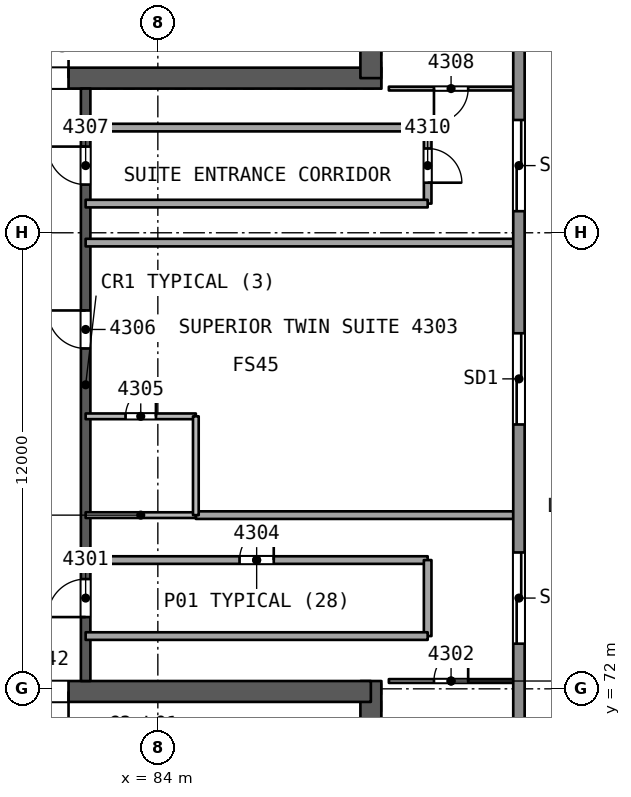
"""IFC4 building model, lengths in metres.
Left out: names, types, materials, properties, quantities, classifications, styles, units other than length and angle.
Written with IfcOpenShell. Run it as: python <this file> out.ifc"""

import sys

from ifc_helpers import new_model, si_unit, direction, frame, frame_2d, origin, place, context, subcontext, project, spatial, rectangle, extrude, element, fill, save


model = new_model("IFC4")
c1 = context("Model", 3, precision=1e-05, world=origin(), true_north=direction((0.0, 1.0)))
c2 = subcontext(c1, "Body", "Model", "MODEL_VIEW")
j1 = project(units=[si_unit("LENGTHUNIT", "METRE"), si_unit("PLANEANGLEUNIT", "RADIAN")], contexts=[c1])
p1 = place(None, origin())
s1 = spatial("IfcSite", under=j1, at=p1, CompositionType="ELEMENT")
p2 = place(p1, origin())
s2 = spatial("IfcBuilding", under=s1, at=p2, CompositionType="ELEMENT")
p3 = place(p2, frame((0.0, 0.0, 178.5)))
s3 = spatial("IfcBuildingStorey", under=s2, at=p3, CompositionType="ELEMENT", Elevation=178.5)
p4 = place(p3, frame((79.659, 88.069, 0.0), z_axis=(0.0, 0.0, 1.0), x_axis=(1.0, 0.0, 0.0)))
e1 = element("IfcWall", 1, at=p4, inside=s3, PredefinedType="SHEAR", context=c2, shape_type="SweptSolid", body=[
    extrude(rectangle(XDim=10.221, YDim=0.55, at=frame_2d((5.111, 0.0))), origin(), (0.0, 0.0, 1.0), 3.7),
])
p5 = place(p4, frame((0.791, 0.0, 0.0)))
e2 = element("IfcOpeningElement", 2, at=p5, cuts=e1, PredefinedType="OPENING", context=c2, shape_type="SweptSolid", body=[
    extrude(rectangle(XDim=1.2, YDim=2.1, at=frame_2d((0.6, 1.05))), frame((0.0, 0.286, 0.0), z_axis=(0.0, -1.0, 0.0), x_axis=(1.0, 0.0, 0.0)), (0.0, 0.0, 1.0), 0.571),
])
p6 = place(p3, frame((89.605, 88.069, 0.0), z_axis=(0.0, 0.0, 1.0), x_axis=(0.0, 1.0, 0.0)))
e3 = element("IfcWall", 3, at=p6, inside=s3, PredefinedType="SHEAR", context=c2, shape_type="SweptSolid", body=[
    extrude(rectangle(XDim=14.058, YDim=0.55, at=frame_2d((7.029, 0.0))), origin(), (0.0, 0.0, 1.0), 3.7),
])
p7 = place(p3, frame((89.605, 58.031, 0.0), z_axis=(0.0, 0.0, 1.0), x_axis=(0.0, 1.0, 0.0)))
e4 = element("IfcWall", 4, at=p7, inside=s3, PredefinedType="SHEAR", context=c2, shape_type="SweptSolid", body=[
    extrude(rectangle(XDim=14.175, YDim=0.55, at=frame_2d((7.087, 0.0))), origin(), (0.0, 0.0, 1.0), 3.7),
])
p8 = place(p3, frame((89.605, 71.931, 0.0), z_axis=(0.0, 0.0, 1.0), x_axis=(-1.0, 0.0, 0.0)))
e5 = element("IfcWall", 5, at=p8, inside=s3, PredefinedType="SHEAR", context=c2, shape_type="SweptSolid", body=[
    extrude(rectangle(XDim=10.105, YDim=0.55, at=frame_2d((5.052, 0.0))), origin(), (0.0, 0.0, 1.0), 3.7),
])
p9 = place(p8, frame((7.955, 0.0, 0.0)))
e6 = element("IfcOpeningElement", 6, at=p9, cuts=e5, PredefinedType="OPENING", context=c2, shape_type="SweptSolid", body=[
    extrude(rectangle(XDim=1.2, YDim=2.1, at=frame_2d((0.6, 1.05))), frame((0.0, 0.286, 0.0), z_axis=(0.0, -1.0, 0.0), x_axis=(1.0, 0.0, 0.0)), (0.0, 0.0, 1.0), 0.571),
])
p10 = place(p3, frame((82.1, 72.206, 0.0), z_axis=(0.0, 0.0, 1.0), x_axis=(0.0, 1.0, 0.0)))
e7 = element("IfcWall", 7, at=p10, inside=s3, PredefinedType="SHEAR", context=c2, shape_type="SweptSolid", body=[
    extrude(rectangle(XDim=15.588, YDim=0.25, at=frame_2d((7.794, 0.0))), origin(), (0.0, 0.0, 1.0), 3.25),
])
p11 = place(p10, frame((1.682, 0.0, 0.0)))
e8 = element("IfcOpeningElement", 8, at=p11, cuts=e7, PredefinedType="OPENING", context=c2, shape_type="SweptSolid", body=[
    extrude(rectangle(XDim=1.0, YDim=2.1, at=frame_2d((0.5, 1.05))), frame((0.0, 0.135, 0.0), z_axis=(0.0, -1.0, 0.0), x_axis=(1.0, 0.0, 0.0)), (0.0, 0.0, 1.0), 0.271),
])
p12 = place(p10, frame((8.75, 0.0, 0.0)))
e9 = element("IfcOpeningElement", 9, at=p12, cuts=e7, PredefinedType="OPENING", context=c2, shape_type="SweptSolid", body=[
    extrude(rectangle(XDim=1.0, YDim=2.1, at=frame_2d((0.5, 1.05))), frame((0.0, 0.135, 0.0), z_axis=(0.0, -1.0, 0.0), x_axis=(1.0, 0.0, 0.0)), (0.0, 0.0, 1.0), 0.271),
])
p13 = place(p10, frame((13.062, 0.0, 0.0)))
e10 = element("IfcOpeningElement", 10, at=p13, cuts=e7, PredefinedType="OPENING", context=c2, shape_type="SweptSolid", body=[
    extrude(rectangle(XDim=1.0, YDim=2.1, at=frame_2d((0.5, 1.05))), frame((0.0, 0.135, 0.0), z_axis=(0.0, -1.0, 0.0), x_axis=(1.0, 0.0, 0.0)), (0.0, 0.0, 1.0), 0.271),
])
p14 = place(p3, frame((90.079, 72.206, 0.0), z_axis=(0.0, 0.0, 1.0), x_axis=(1.0, 0.0, 0.0)))
e11 = element("IfcWall", 11, at=p14, inside=s3, PredefinedType="PARTITIONING", context=c2, shape_type="SweptSolid", body=[
    extrude(rectangle(XDim=3.274, YDim=0.1, at=frame_2d((1.637, 0.0))), origin(), (0.0, 0.0, 1.0), 3.25),
])
p15 = place(p14, frame((1.187, 0.0, 0.0)))
e12 = element("IfcOpeningElement", 12, at=p15, cuts=e11, PredefinedType="OPENING", context=c2, shape_type="SweptSolid", body=[
    extrude(rectangle(XDim=0.9, YDim=2.1, at=frame_2d((0.45, 1.05))), frame((0.0, 0.061, 0.0), z_axis=(0.0, -1.0, 0.0), x_axis=(1.0, 0.0, 0.0)), (0.0, 0.0, 1.0), 0.121),
])
p16 = place(p3, frame((82.1, 75.388, 0.0), z_axis=(0.0, 0.0, 1.0), x_axis=(1.0, 0.0, 0.0)))
e13 = element("IfcWall", 13, at=p16, inside=s3, PredefinedType="PARTITIONING", context=c2, shape_type="SweptSolid", body=[
    extrude(rectangle(XDim=9.0, YDim=0.2, at=frame_2d((4.5, 0.0))), origin(), (0.0, 0.0, 1.0), 3.25),
])
p17 = place(p16, frame((4.05, 0.0, 0.0)))
e14 = element("IfcOpeningElement", 14, at=p17, cuts=e13, PredefinedType="OPENING", context=c2, shape_type="SweptSolid", body=[
    extrude(rectangle(XDim=0.9, YDim=2.1, at=frame_2d((0.45, 1.05))), frame((0.0, 0.11, 0.0), z_axis=(0.0, -1.0, 0.0), x_axis=(1.0, 0.0, 0.0)), (0.0, 0.0, 1.0), 0.221),
])
p18 = place(p3, frame((91.1, 75.388, 0.0), z_axis=(0.0, 0.0, 1.0), x_axis=(0.0, -1.0, 0.0)))
e15 = element("IfcWall", 15, at=p18, inside=s3, PredefinedType="PARTITIONING", context=c2, shape_type="SweptSolid", body=[
    extrude(rectangle(XDim=2.0, YDim=0.2, at=frame_2d((1.0, 0.0))), origin(), (0.0, 0.0, 1.0), 3.25),
])
p19 = place(p3, frame((91.1, 73.388, 0.0), z_axis=(0.0, 0.0, 1.0), x_axis=(-1.0, 0.0, 0.0)))
e16 = element("IfcWall", 16, at=p19, inside=s3, PredefinedType="PARTITIONING", context=c2, shape_type="SweptSolid", body=[
    extrude(rectangle(XDim=9.0, YDim=0.2, at=frame_2d((4.5, 0.0))), origin(), (0.0, 0.0, 1.0), 3.25),
])
p20 = place(p3, frame((93.353, 76.571, 0.0), z_axis=(0.0, 0.0, 1.0), x_axis=(-1.0, 0.0, 0.0)))
e17 = element("IfcWall", 17, at=p20, inside=s3, PredefinedType="PARTITIONING", context=c2, shape_type="SweptSolid", body=[
    extrude(rectangle(XDim=8.353, YDim=0.2, at=frame_2d((4.177, 0.0))), origin(), (0.0, 0.0, 1.0), 3.25),
])
p21 = place(p3, frame((85.0, 76.571, 0.0), z_axis=(0.0, 0.0, 1.0), x_axis=(-1.0, 0.0, 0.0)))
e18 = element("IfcWall", 18, at=p21, inside=s3, PredefinedType="PARTITIONING", context=c2, shape_type="SweptSolid", body=[
    extrude(rectangle(XDim=2.9, YDim=0.15, at=frame_2d((1.45, 0.0))), origin(), (0.0, 0.0, 1.0), 3.25),
])
p22 = place(p3, frame((82.1, 79.171, 0.0), z_axis=(0.0, 0.0, 1.0), x_axis=(1.0, 0.0, 0.0)))
e19 = element("IfcWall", 19, at=p22, inside=s3, PredefinedType="PARTITIONING", context=c2, shape_type="SweptSolid", body=[
    extrude(rectangle(XDim=2.9, YDim=0.15, at=frame_2d((1.45, 0.0))), origin(), (0.0, 0.0, 1.0), 3.25),
])
p23 = place(p22, frame((1.05, 0.0, 0.0)))
e20 = element("IfcOpeningElement", 20, at=p23, cuts=e19, PredefinedType="OPENING", context=c2, shape_type="SweptSolid", body=[
    extrude(rectangle(XDim=0.8, YDim=2.1, at=frame_2d((0.4, 1.05))), frame((0.0, 0.085, 0.0), z_axis=(0.0, -1.0, 0.0), x_axis=(1.0, 0.0, 0.0)), (0.0, 0.0, 1.0), 0.171),
])
p24 = place(p3, frame((85.0, 79.171, 0.0), z_axis=(0.0, 0.0, 1.0), x_axis=(0.0, -1.0, 0.0)))
e21 = element("IfcWall", 21, at=p24, inside=s3, PredefinedType="PARTITIONING", context=c2, shape_type="SweptSolid", body=[
    extrude(rectangle(XDim=2.6, YDim=0.15, at=frame_2d((1.3, 0.0))), origin(), (0.0, 0.0, 1.0), 3.25),
])
p25 = place(p3, frame((93.353, 83.741, 0.0), z_axis=(0.0, 0.0, 1.0), x_axis=(-1.0, 0.0, 0.0)))
e22 = element("IfcWall", 22, at=p25, inside=s3, PredefinedType="PARTITIONING", context=c2, shape_type="SweptSolid", body=[
    extrude(rectangle(XDim=11.253, YDim=0.2, at=frame_2d((5.626, 0.0))), origin(), (0.0, 0.0, 1.0), 3.25),
])
p26 = place(p3, frame((93.353, 87.794, 0.0), z_axis=(0.0, 0.0, 1.0), x_axis=(-1.0, 0.0, 0.0)))
e23 = element("IfcWall", 23, at=p26, inside=s3, PredefinedType="PARTITIONING", context=c2, shape_type="SweptSolid", body=[
    extrude(rectangle(XDim=3.274, YDim=0.1, at=frame_2d((1.637, 0.0))), origin(), (0.0, 0.0, 1.0), 3.25),
])
p27 = place(p26, frame((1.187, 0.0, 0.0)))
e24 = element("IfcOpeningElement", 24, at=p27, cuts=e23, PredefinedType="OPENING", context=c2, shape_type="SweptSolid", body=[
    extrude(rectangle(XDim=0.9, YDim=2.1, at=frame_2d((0.45, 1.05))), frame((0.0, 0.061, 0.0), z_axis=(0.0, -1.0, 0.0), x_axis=(1.0, 0.0, 0.0)), (0.0, 0.0, 1.0), 0.121),
])
p28 = place(p3, frame((82.1, 86.768, 0.0), z_axis=(0.0, 0.0, 1.0), x_axis=(1.0, 0.0, 0.0)))
e25 = element("IfcWall", 25, at=p28, inside=s3, PredefinedType="PARTITIONING", context=c2, shape_type="SweptSolid", body=[
    extrude(rectangle(XDim=9.0, YDim=0.2, at=frame_2d((4.5, 0.0))), origin(), (0.0, 0.0, 1.0), 3.25),
])
p29 = place(p3, frame((91.1, 86.768, 0.0), z_axis=(0.0, 0.0, 1.0), x_axis=(0.0, -1.0, 0.0)))
e26 = element("IfcWall", 26, at=p29, inside=s3, PredefinedType="PARTITIONING", context=c2, shape_type="SweptSolid", body=[
    extrude(rectangle(XDim=2.0, YDim=0.2, at=frame_2d((1.0, 0.0))), origin(), (0.0, 0.0, 1.0), 3.25),
])
p30 = place(p29, frame((0.55, 0.0, 0.0)))
e27 = element("IfcOpeningElement", 27, at=p30, cuts=e26, PredefinedType="OPENING", context=c2, shape_type="SweptSolid", body=[
    extrude(rectangle(XDim=0.9, YDim=2.1, at=frame_2d((0.45, 1.05))), frame((0.0, 0.11, 0.0), z_axis=(0.0, -1.0, 0.0), x_axis=(1.0, 0.0, 0.0)), (0.0, 0.0, 1.0), 0.221),
])
p31 = place(p3, frame((91.1, 84.768, 0.0), z_axis=(0.0, 0.0, 1.0), x_axis=(-1.0, 0.0, 0.0)))
e28 = element("IfcWall", 28, at=p31, inside=s3, PredefinedType="PARTITIONING", context=c2, shape_type="SweptSolid", body=[
    extrude(rectangle(XDim=9.0, YDim=0.2, at=frame_2d((4.5, 0.0))), origin(), (0.0, 0.0, 1.0), 3.25),
])
p32 = place(p3, frame((93.502, 106.603, 0.0), z_axis=(0.0, 0.0, 1.0), x_axis=(0.0, -1.0, 0.0)))
e29 = element("IfcWall", 29, at=p32, inside=s3, PredefinedType="SOLIDWALL", context=c2, shape_type="SweptSolid", body=[
    extrude(rectangle(XDim=53.206, YDim=0.3, at=frame_2d((26.603, 0.0))), origin(), (0.0, 0.0, 1.0), 3.25),
])
p33 = place(p32, frame((31.015, 0.0, 0.0)))
e30 = element("IfcOpeningElement", 30, at=p33, cuts=e29, PredefinedType="OPENING", context=c2, shape_type="SweptSolid", body=[
    extrude(rectangle(XDim=2.4, YDim=2.4, at=frame_2d((1.2, 1.2))), frame((0.0, 0.161, 0.0), z_axis=(0.0, -1.0, 0.0), x_axis=(1.0, 0.0, 0.0)), (0.0, 0.0, 1.0), 0.321),
])
p34 = place(p32, frame((41.356, 0.0, 0.0)))
e31 = element("IfcOpeningElement", 31, at=p34, cuts=e29, PredefinedType="OPENING", context=c2, shape_type="SweptSolid", body=[
    extrude(rectangle(XDim=2.4, YDim=2.4, at=frame_2d((1.2, 1.2))), frame((0.0, 0.161, 0.0), z_axis=(0.0, -1.0, 0.0), x_axis=(1.0, 0.0, 0.0)), (0.0, 0.0, 1.0), 0.321),
])
p35 = place(p32, frame((19.635, 0.0, 0.0)))
e32 = element("IfcOpeningElement", 32, at=p35, cuts=e29, PredefinedType="OPENING", context=c2, shape_type="SweptSolid", body=[
    extrude(rectangle(XDim=2.4, YDim=2.4, at=frame_2d((1.2, 1.2))), frame((0.0, 0.161, 0.0), z_axis=(0.0, -1.0, 0.0), x_axis=(1.0, 0.0, 0.0)), (0.0, 0.0, 1.0), 0.321),
])
p36 = place(p32, frame((9.4, 0.0, 0.0)))
e33 = element("IfcOpeningElement", 33, at=p36, cuts=e29, PredefinedType="OPENING", context=c2, shape_type="SweptSolid", body=[
    extrude(rectangle(XDim=2.4, YDim=2.4, at=frame_2d((1.2, 1.2))), frame((0.0, 0.161, 0.0), z_axis=(0.0, -1.0, 0.0), x_axis=(1.0, 0.0, 0.0)), (0.0, 0.0, 1.0), 0.321),
])
p37 = place(p32, frame((25.247, 0.0, 0.0)))
e34 = element("IfcOpeningElement", 34, at=p37, cuts=e29, PredefinedType="OPENING", context=c2, shape_type="SweptSolid", body=[
    extrude(rectangle(XDim=2.4, YDim=2.4, at=frame_2d((1.2, 1.2))), frame((0.0, 0.161, 0.0), z_axis=(0.0, -1.0, 0.0), x_axis=(1.0, 0.0, 0.0)), (0.0, 0.0, 1.0), 0.321),
])
p38 = place(p3, frame((42.71, 82.722, 0.0), z_axis=(0.0, 0.0, 1.0), x_axis=(0.866026647012, 0.499997846661, 0.0)))
e35 = element("IfcWall", 35, at=p38, inside=s3, PredefinedType="SOLIDWALL", context=c2, shape_type="SweptSolid", body=[
    extrude(rectangle(XDim=53.206, YDim=0.3, at=frame_2d((26.603, 0.0))), origin(), (0.0, 0.0, 1.0), 3.25),
])
p39 = place(p38, frame((30.391, 0.0, 0.0)))
e36 = element("IfcOpeningElement", 36, at=p39, cuts=e35, PredefinedType="OPENING", context=c2, shape_type="SweptSolid", body=[
    extrude(rectangle(XDim=2.4, YDim=2.4, at=frame_2d((1.2, 1.2))), frame((0.0, 0.161, 0.0), z_axis=(0.0, -1.0, 0.0), x_axis=(1.0, 0.0, 0.0)), (0.0, 0.0, 1.0), 0.321),
])
p40 = place(p38, frame((41.356, 0.0, 0.0)))
e37 = element("IfcOpeningElement", 37, at=p40, cuts=e35, PredefinedType="OPENING", context=c2, shape_type="SweptSolid", body=[
    extrude(rectangle(XDim=2.4, YDim=2.4, at=frame_2d((1.2, 1.2))), frame((0.0, 0.161, 0.0), z_axis=(0.0, -1.0, 0.0), x_axis=(1.0, 0.0, 0.0)), (0.0, 0.0, 1.0), 0.321),
])
p41 = place(p38, frame((19.635, 0.0, 0.0)))
e38 = element("IfcOpeningElement", 38, at=p41, cuts=e35, PredefinedType="OPENING", context=c2, shape_type="SweptSolid", body=[
    extrude(rectangle(XDim=2.4, YDim=2.4, at=frame_2d((1.2, 1.2))), frame((0.0, 0.161, 0.0), z_axis=(0.0, -1.0, 0.0), x_axis=(1.0, 0.0, 0.0)), (0.0, 0.0, 1.0), 0.321),
])
p42 = place(p38, frame((9.4, 0.0, 0.0)))
e39 = element("IfcOpeningElement", 39, at=p42, cuts=e35, PredefinedType="OPENING", context=c2, shape_type="SweptSolid", body=[
    extrude(rectangle(XDim=2.4, YDim=2.4, at=frame_2d((1.2, 1.2))), frame((0.0, 0.161, 0.0), z_axis=(0.0, -1.0, 0.0), x_axis=(1.0, 0.0, 0.0)), (0.0, 0.0, 1.0), 0.321),
])
p43 = place(p38, frame((26.404, 0.0, 0.9)))
e40 = element("IfcOpeningElement", 40, at=p43, cuts=e35, PredefinedType="OPENING", context=c2, shape_type="SweptSolid", body=[
    extrude(rectangle(XDim=1.8, YDim=1.5, at=frame_2d((0.9, 0.75))), frame((0.0, 0.161, 0.0), z_axis=(0.0, -1.0, 0.0), x_axis=(1.0, 0.0, 0.0)), (0.0, 0.0, 1.0), 0.321),
])
p44 = place(p38, frame((23.442, 0.0, 0.9)))
e41 = element("IfcOpeningElement", 41, at=p44, cuts=e35, PredefinedType="OPENING", context=c2, shape_type="SweptSolid", body=[
    extrude(rectangle(XDim=1.8, YDim=1.5, at=frame_2d((0.9, 0.75))), frame((0.0, 0.161, 0.0), z_axis=(0.0, -1.0, 0.0), x_axis=(1.0, 0.0, 0.0)), (0.0, 0.0, 1.0), 0.321),
])
p45 = place(p3, frame((88.788, 50.676, 0.0), z_axis=(0.0, 0.0, 1.0), x_axis=(-0.866026647012, 0.499997846661, 0.0)))
e42 = element("IfcWall", 42, at=p45, inside=s3, PredefinedType="SOLIDWALL", context=c2, shape_type="SweptSolid", body=[
    extrude(rectangle(XDim=53.206, YDim=0.3, at=frame_2d((26.603, 0.0))), origin(), (0.0, 0.0, 1.0), 3.25),
])
p46 = place(p45, frame((31.015, 0.0, 0.0)))
e43 = element("IfcOpeningElement", 43, at=p46, cuts=e42, PredefinedType="OPENING", context=c2, shape_type="SweptSolid", body=[
    extrude(rectangle(XDim=2.4, YDim=2.4, at=frame_2d((1.2, 1.2))), frame((0.0, 0.161, 0.0), z_axis=(0.0, -1.0, 0.0), x_axis=(1.0, 0.0, 0.0)), (0.0, 0.0, 1.0), 0.321),
])
p47 = place(p45, frame((41.356, 0.0, 0.0)))
e44 = element("IfcOpeningElement", 44, at=p47, cuts=e42, PredefinedType="OPENING", context=c2, shape_type="SweptSolid", body=[
    extrude(rectangle(XDim=2.4, YDim=2.4, at=frame_2d((1.2, 1.2))), frame((0.0, 0.161, 0.0), z_axis=(0.0, -1.0, 0.0), x_axis=(1.0, 0.0, 0.0)), (0.0, 0.0, 1.0), 0.321),
])
p48 = place(p45, frame((20.726, 0.0, 0.0)))
e45 = element("IfcOpeningElement", 45, at=p48, cuts=e42, PredefinedType="OPENING", context=c2, shape_type="SweptSolid", body=[
    extrude(rectangle(XDim=2.4, YDim=2.4, at=frame_2d((1.2, 1.2))), frame((0.0, 0.161, 0.0), z_axis=(0.0, -1.0, 0.0), x_axis=(1.0, 0.0, 0.0)), (0.0, 0.0, 1.0), 0.321),
])
p49 = place(p45, frame((9.4, 0.0, 0.0)))
e46 = element("IfcOpeningElement", 46, at=p49, cuts=e42, PredefinedType="OPENING", context=c2, shape_type="SweptSolid", body=[
    extrude(rectangle(XDim=2.4, YDim=2.4, at=frame_2d((1.2, 1.2))), frame((0.0, 0.161, 0.0), z_axis=(0.0, -1.0, 0.0), x_axis=(1.0, 0.0, 0.0)), (0.0, 0.0, 1.0), 0.321),
])
p50 = place(p45, frame((26.338, 0.0, 0.0)))
e47 = element("IfcOpeningElement", 47, at=p50, cuts=e42, PredefinedType="OPENING", context=c2, shape_type="SweptSolid", body=[
    extrude(rectangle(XDim=2.4, YDim=2.4, at=frame_2d((1.2, 1.2))), frame((0.0, 0.161, 0.0), z_axis=(0.0, -1.0, 0.0), x_axis=(1.0, 0.0, 0.0)), (0.0, 0.0, 1.0), 0.321),
])
p51 = place(p11, origin())
e48 = element("IfcDoor", 48, at=p51, inside=s3, OperationType="SINGLE_SWING_LEFT", PredefinedType="NOTDEFINED", context=c2, shape_type="SweptSolid", body=[
    extrude(rectangle(XDim=1.0, YDim=2.1, at=frame_2d((0.5, 1.05))), frame((0.0, 0.025, 0.0), z_axis=(0.0, -1.0, 0.0), x_axis=(1.0, 0.0, 0.0)), (0.0, 0.0, 1.0), 0.05),
])
fill(e8, e48)
p52 = place(p15, origin())
e49 = element("IfcDoor", 49, at=p52, inside=s3, OperationType="SINGLE_SWING_RIGHT", PredefinedType="NOTDEFINED", context=c2, shape_type="SweptSolid", body=[
    extrude(rectangle(XDim=0.9, YDim=2.1, at=frame_2d((0.45, 1.05))), frame((0.0, 0.025, 0.0), z_axis=(0.0, -1.0, 0.0), x_axis=(1.0, 0.0, 0.0)), (0.0, 0.0, 1.0), 0.05),
])
fill(e12, e49)
p53 = place(p17, origin())
e50 = element("IfcDoor", 50, at=p53, inside=s3, OperationType="SINGLE_SWING_RIGHT", PredefinedType="NOTDEFINED", context=c2, shape_type="SweptSolid", body=[
    extrude(rectangle(XDim=0.9, YDim=2.1, at=frame_2d((0.45, 1.05))), frame((0.0, 0.025, 0.0), z_axis=(0.0, -1.0, 0.0), x_axis=(1.0, 0.0, 0.0)), (0.0, 0.0, 1.0), 0.05),
])
fill(e14, e50)
p54 = place(p23, origin())
e51 = element("IfcDoor", 51, at=p54, inside=s3, OperationType="SINGLE_SWING_RIGHT", PredefinedType="NOTDEFINED", context=c2, shape_type="SweptSolid", body=[
    extrude(rectangle(XDim=0.8, YDim=2.1, at=frame_2d((0.4, 1.05))), frame((0.0, 0.025, 0.0), z_axis=(0.0, -1.0, 0.0), x_axis=(1.0, 0.0, 0.0)), (0.0, 0.0, 1.0), 0.05),
])
fill(e20, e51)
p55 = place(p12, origin())
e52 = element("IfcDoor", 52, at=p55, inside=s3, OperationType="SINGLE_SWING_RIGHT", PredefinedType="NOTDEFINED", context=c2, shape_type="SweptSolid", body=[
    extrude(rectangle(XDim=1.0, YDim=2.1, at=frame_2d((0.5, 1.05))), frame((0.0, 0.025, 0.0), z_axis=(0.0, -1.0, 0.0), x_axis=(1.0, 0.0, 0.0)), (0.0, 0.0, 1.0), 0.05),
])
fill(e9, e52)
p56 = place(p13, origin())
e53 = element("IfcDoor", 53, at=p56, inside=s3, OperationType="SINGLE_SWING_RIGHT", PredefinedType="NOTDEFINED", context=c2, shape_type="SweptSolid", body=[
    extrude(rectangle(XDim=1.0, YDim=2.1, at=frame_2d((0.5, 1.05))), frame((0.0, 0.025, 0.0), z_axis=(0.0, -1.0, 0.0), x_axis=(1.0, 0.0, 0.0)), (0.0, 0.0, 1.0), 0.05),
])
fill(e10, e53)
p57 = place(p27, origin())
e54 = element("IfcDoor", 54, at=p57, inside=s3, OperationType="SINGLE_SWING_RIGHT", PredefinedType="NOTDEFINED", context=c2, shape_type="SweptSolid", body=[
    extrude(rectangle(XDim=0.9, YDim=2.1, at=frame_2d((0.45, 1.05))), frame((0.0, 0.025, 0.0), z_axis=(0.0, -1.0, 0.0), x_axis=(1.0, 0.0, 0.0)), (0.0, 0.0, 1.0), 0.05),
])
fill(e24, e54)
p58 = place(p30, origin())
e55 = element("IfcDoor", 55, at=p58, inside=s3, OperationType="SINGLE_SWING_RIGHT", PredefinedType="NOTDEFINED", context=c2, shape_type="SweptSolid", body=[
    extrude(rectangle(XDim=0.9, YDim=2.1, at=frame_2d((0.45, 1.05))), frame((0.0, 0.025, 0.0), z_axis=(0.0, -1.0, 0.0), x_axis=(1.0, 0.0, 0.0)), (0.0, 0.0, 1.0), 0.05),
])
fill(e27, e55)
p59 = place(p33, origin())
e56 = element("IfcDoor", 56, at=p59, inside=s3, OperationType="SLIDING_TO_LEFT", PredefinedType="NOTDEFINED", context=c2, shape_type="SweptSolid", body=[
    extrude(rectangle(XDim=2.4, YDim=2.4, at=frame_2d((1.2, 1.2))), frame((0.0, 0.025, 0.0), z_axis=(0.0, -1.0, 0.0), x_axis=(1.0, 0.0, 0.0)), (0.0, 0.0, 1.0), 0.05),
])
fill(e30, e56)
p60 = place(p35, origin())
e57 = element("IfcDoor", 57, at=p60, inside=s3, OperationType="SLIDING_TO_LEFT", PredefinedType="NOTDEFINED", context=c2, shape_type="SweptSolid", body=[
    extrude(rectangle(XDim=2.4, YDim=2.4, at=frame_2d((1.2, 1.2))), frame((0.0, 0.025, 0.0), z_axis=(0.0, -1.0, 0.0), x_axis=(1.0, 0.0, 0.0)), (0.0, 0.0, 1.0), 0.05),
])
fill(e32, e57)
p61 = place(p37, origin())
e58 = element("IfcDoor", 58, at=p61, inside=s3, OperationType="SLIDING_TO_LEFT", PredefinedType="NOTDEFINED", context=c2, shape_type="SweptSolid", body=[
    extrude(rectangle(XDim=2.4, YDim=2.4, at=frame_2d((1.2, 1.2))), frame((0.0, 0.025, 0.0), z_axis=(0.0, -1.0, 0.0), x_axis=(1.0, 0.0, 0.0)), (0.0, 0.0, 1.0), 0.05),
])
fill(e34, e58)
p62 = place(p5, origin())
e59 = element("IfcDoor", 59, at=p62, inside=s3, OperationType="SINGLE_SWING_RIGHT", PredefinedType="NOTDEFINED", context=c2, shape_type="SweptSolid", body=[
    extrude(rectangle(XDim=1.2, YDim=2.1, at=frame_2d((0.6, 1.05))), frame((0.0, 0.025, 0.0), z_axis=(0.0, -1.0, 0.0), x_axis=(1.0, 0.0, 0.0)), (0.0, 0.0, 1.0), 0.05),
])
fill(e2, e59)
p63 = place(p9, origin())
e60 = element("IfcDoor", 60, at=p63, inside=s3, OperationType="SINGLE_SWING_LEFT", PredefinedType="NOTDEFINED", context=c2, shape_type="SweptSolid", body=[
    extrude(rectangle(XDim=1.2, YDim=2.1, at=frame_2d((0.6, 1.05))), frame((0.0, 0.025, 0.0), z_axis=(0.0, -1.0, 0.0), x_axis=(1.0, 0.0, 0.0)), (0.0, 0.0, 1.0), 0.05),
])
fill(e6, e60)
save(model, sys.argv[1])
